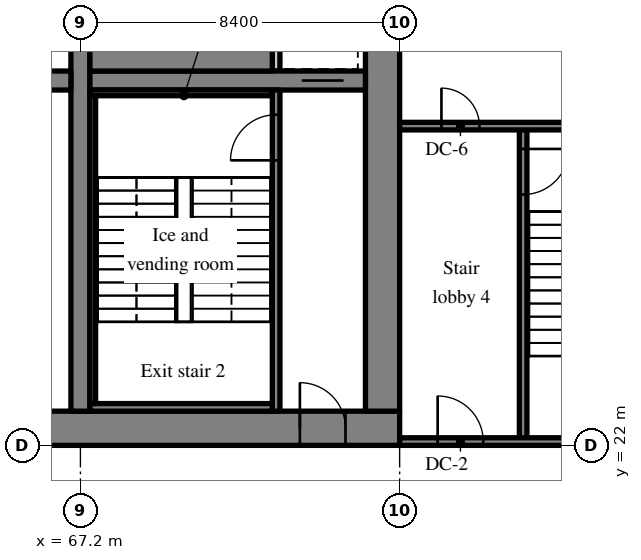
"""IFC4 building model, lengths in metres.
Left out: names, types, materials, properties, quantities, classifications, styles, units other than length and angle.
Written with IfcOpenShell. Run it as: python <this file> out.ifc"""

import sys

from ifc_helpers import new_model, si_unit, direction, frame, frame_2d, origin, place, context, subcontext, project, spatial, rectangle, extrude, source, transform, mapped, element, fill, save


model = new_model("IFC4")
c1 = context("Model", 3, precision=1e-05, world=origin(), true_north=direction((0.0, 1.0)))
c2 = subcontext(c1, "Body", "Model", "MODEL_VIEW")
j1 = project(units=[si_unit("LENGTHUNIT", "METRE"), si_unit("PLANEANGLEUNIT", "RADIAN")], contexts=[c1])
p1 = place(None, origin())
s1 = spatial("IfcSite", under=j1, at=p1, CompositionType="ELEMENT")
p2 = place(p1, origin())
s2 = spatial("IfcBuilding", under=s1, at=p2, CompositionType="ELEMENT")
p3 = place(p2, frame((0.0, 0.0, 133.2)))
s3 = spatial("IfcBuildingStorey", under=s2, at=p3, CompositionType="ELEMENT", Elevation=133.2)
m1 = source(origin(), c2, "Body", "SweptSolid", [
    extrude(rectangle(XDim=50.4, YDim=0.9, at=frame_2d((25.2, 0.0))), origin(), (0.0, 0.0, 1.0), 3.52),
])
p4 = place(p3, frame((25.2, 22.45, 0.0), z_axis=(0.0, 0.0, 1.0), x_axis=(1.0, 0.0, 0.0)))
e1 = element("IfcWall", 1, at=p4, inside=s3, PredefinedType="SHEAR", context=c2, shape_type="MappedRepresentation", body=[
    mapped(m1, transform((0.0, 0.0, 0.0), scale=1.0)),
])
m2 = source(origin(), c2, "Body", "SweptSolid", [
    extrude(rectangle(XDim=1.8, YDim=2.1, at=frame_2d((0.9, 1.05))), frame((0.0, 0.46, 0.0), z_axis=(0.0, -1.0, 0.0), x_axis=(1.0, 0.0, 0.0)), (0.0, 0.0, 1.0), 0.92),
])
p5 = place(p4, frame((15.9, 0.0, 0.0)))
e2 = element("IfcOpeningElement", 2, at=p5, cuts=e1, PredefinedType="OPENING", context=c2, shape_type="MappedRepresentation", body=[
    mapped(m2, transform((0.0, 0.0, 0.0), scale=1.0)),
])
m3 = source(origin(), c2, "Body", "SweptSolid", [
    extrude(rectangle(XDim=1.2, YDim=2.1, at=frame_2d((0.6, 1.05))), frame((0.0, 0.46, 0.0), z_axis=(0.0, -1.0, 0.0), x_axis=(1.0, 0.0, 0.0)), (0.0, 0.0, 1.0), 0.92),
])
p6 = place(p4, frame((26.975, 0.0, 0.0)))
e3 = element("IfcOpeningElement", 3, at=p6, cuts=e1, PredefinedType="OPENING", context=c2, shape_type="MappedRepresentation", body=[
    mapped(m3, transform((0.0, 0.0, 0.0), scale=1.0)),
])
m4 = source(origin(), c2, "Body", "SweptSolid", [
    extrude(rectangle(XDim=0.9, YDim=2.1, at=frame_2d((0.45, 1.05))), frame((0.0, 0.46, 0.0), z_axis=(0.0, -1.0, 0.0), x_axis=(1.0, 0.0, 0.0)), (0.0, 0.0, 1.0), 0.92),
])
p7 = place(p4, frame((34.5, 0.0, 0.0)))
e4 = element("IfcOpeningElement", 4, at=p7, cuts=e1, PredefinedType="OPENING", context=c2, shape_type="MappedRepresentation", body=[
    mapped(m4, transform((0.0, 0.0, 0.0), scale=1.0)),
])
p8 = place(p4, frame((31.5, 0.0, 0.0)))
e5 = element("IfcOpeningElement", 5, at=p8, cuts=e1, PredefinedType="OPENING", context=c2, shape_type="MappedRepresentation", body=[
    mapped(m4, transform((0.0, 0.0, 0.0), scale=1.0)),
])
p9 = place(p4, frame((39.788, 0.0, 0.0)))
e6 = element("IfcOpeningElement", 6, at=p9, cuts=e1, PredefinedType="OPENING", context=c2, shape_type="MappedRepresentation", body=[
    mapped(m4, transform((0.0, 0.0, 0.0), scale=1.0)),
])
p10 = place(p4, frame((36.762, 0.0, 0.0)))
e7 = element("IfcOpeningElement", 7, at=p10, cuts=e1, PredefinedType="OPENING", context=c2, shape_type="MappedRepresentation", body=[
    mapped(m4, transform((0.0, 0.0, 0.0), scale=1.0)),
])
p11 = place(p4, frame((6.45, 0.0, 0.0)))
e8 = element("IfcOpeningElement", 8, at=p11, cuts=e1, PredefinedType="OPENING", context=c2, shape_type="MappedRepresentation", body=[
    mapped(m3, transform((0.0, 0.0, 0.0), scale=1.0)),
])
p12 = place(p4, frame((47.775, 0.0, 0.0)))
e9 = element("IfcOpeningElement", 9, at=p12, cuts=e1, PredefinedType="OPENING", context=c2, shape_type="MappedRepresentation", body=[
    mapped(m3, transform((0.0, 0.0, 0.0), scale=1.0)),
])
m5 = source(origin(), c2, "Body", "SweptSolid", [
    extrude(rectangle(XDim=18.2, YDim=0.9, at=frame_2d((9.1, 0.0))), origin(), (0.0, 0.0, 1.0), 3.52),
])
p13 = place(p3, frame((75.15, 22.9, 0.0), z_axis=(0.0, 0.0, 1.0), x_axis=(0.0, 1.0, 0.0)))
e10 = element("IfcWall", 10, at=p13, inside=s3, PredefinedType="SHEAR", context=c2, shape_type="MappedRepresentation", body=[
    mapped(m5, transform((0.0, 0.0, 0.0), scale=1.0)),
])
p14 = place(p13, frame((12.5, 0.0, 0.0)))
e11 = element("IfcOpeningElement", 11, at=p14, cuts=e10, PredefinedType="OPENING", context=c2, shape_type="MappedRepresentation", body=[
    mapped(m3, transform((0.0, 0.0, 0.0), scale=1.0)),
])
m6 = source(origin(), c2, "Body", "SweptSolid", [
    extrude(rectangle(XDim=18.2, YDim=0.5, at=frame_2d((9.1, 0.0))), origin(), (0.0, 0.0, 1.0), 3.52),
])
p15 = place(p3, frame((67.2, 22.9, 0.0), z_axis=(0.0, 0.0, 1.0), x_axis=(0.0, 1.0, 0.0)))
e12 = element("IfcWall", 12, at=p15, inside=s3, PredefinedType="SHEAR", context=c2, shape_type="MappedRepresentation", body=[
    mapped(m6, transform((0.0, 0.0, 0.0), scale=1.0)),
])
m7 = source(origin(), c2, "Body", "SweptSolid", [
    extrude(rectangle(XDim=16.3, YDim=0.5, at=frame_2d((8.15, 0.0))), origin(), (0.0, 0.0, 1.0), 3.52),
])
p16 = place(p3, frame((50.65, 31.6, 0.0), z_axis=(0.0, 0.0, 1.0), x_axis=(1.0, 0.0, 0.0)))
e13 = element("IfcWall", 13, at=p16, inside=s3, PredefinedType="SHEAR", context=c2, shape_type="MappedRepresentation", body=[
    mapped(m7, transform((0.0, 0.0, 0.0), scale=1.0)),
])
m8 = source(origin(), c2, "Body", "SweptSolid", [
    extrude(rectangle(XDim=1.0, YDim=2.1, at=frame_2d((0.5, 1.05))), frame((0.0, 0.26, 0.0), z_axis=(0.0, -1.0, 0.0), x_axis=(1.0, 0.0, 0.0)), (0.0, 0.0, 1.0), 0.52),
])
p17 = place(p16, frame((0.575, 0.0, 0.0)))
e14 = element("IfcOpeningElement", 14, at=p17, cuts=e13, PredefinedType="OPENING", context=c2, shape_type="MappedRepresentation", body=[
    mapped(m8, transform((0.0, 0.0, 0.0), scale=1.0)),
])
m9 = source(origin(), c2, "Body", "SweptSolid", [
    extrude(rectangle(XDim=7.25, YDim=0.5, at=frame_2d((3.625, 0.0))), origin(), (0.0, 0.0, 1.0), 3.52),
])
p18 = place(p3, frame((67.45, 31.6, 0.0), z_axis=(0.0, 0.0, 1.0), x_axis=(1.0, 0.0, 0.0)))
e15 = element("IfcWall", 15, at=p18, inside=s3, PredefinedType="SHEAR", context=c2, shape_type="MappedRepresentation", body=[
    mapped(m9, transform((0.0, 0.0, 0.0), scale=1.0)),
])
m10 = source(origin(), c2, "Body", "SweptSolid", [
    extrude(rectangle(XDim=1.1, YDim=2.1, at=frame_2d((0.55, 1.05))), frame((0.0, 0.26, 0.0), z_axis=(0.0, -1.0, 0.0), x_axis=(1.0, 0.0, 0.0)), (0.0, 0.0, 1.0), 0.52),
])
p19 = place(p18, frame((5.575, 0.0, 0.0)))
e16 = element("IfcOpeningElement", 16, at=p19, cuts=e15, PredefinedType="OPENING", context=c2, shape_type="MappedRepresentation", body=[
    mapped(m10, transform((0.0, 0.0, 0.0), scale=1.0)),
])
m11 = source(origin(), c2, "Body", "SweptSolid", [
    extrude(rectangle(XDim=8.45, YDim=0.2, at=frame_2d((4.225, 0.0))), origin(), (0.0, 0.0, 1.0), 3.52),
])
p20 = place(p3, frame((72.35, 22.9, 0.0), z_axis=(0.0, 0.0, 1.0), x_axis=(0.0, 1.0, 0.0)))
e17 = element("IfcWall", 17, at=p20, inside=s3, PredefinedType="SOLIDWALL", context=c2, shape_type="MappedRepresentation", body=[
    mapped(m11, transform((0.0, 0.0, 0.0), scale=1.0)),
])
m12 = source(origin(), c2, "Body", "SweptSolid", [
    extrude(rectangle(XDim=1.2, YDim=2.1, at=frame_2d((0.6, 1.05))), frame((0.0, 0.11, 0.0), z_axis=(0.0, -1.0, 0.0), x_axis=(1.0, 0.0, 0.0)), (0.0, 0.0, 1.0), 0.22),
])
p21 = place(p20, frame((6.6, 0.0, 0.0)))
e18 = element("IfcOpeningElement", 18, at=p21, cuts=e17, PredefinedType="OPENING", context=c2, shape_type="MappedRepresentation", body=[
    mapped(m12, transform((0.0, 0.0, 0.0), scale=1.0)),
])
m13 = source(origin(), c2, "Body", "SweptSolid", [
    extrude(rectangle(XDim=1.75, YDim=0.2, at=frame_2d((0.875, 0.0))), origin(), (0.0, 0.0, 1.0), 3.52),
])
p22 = place(p3, frame((72.35, 31.85, 0.0), z_axis=(0.0, 0.0, 1.0), x_axis=(0.0, 1.0, 0.0)))
e19 = element("IfcWall", 19, at=p22, inside=s3, PredefinedType="SOLIDWALL", context=c2, shape_type="MappedRepresentation", body=[
    mapped(m13, transform((0.0, 0.0, 0.0), scale=1.0)),
])
m14 = source(origin(), c2, "Body", "SweptSolid", [
    extrude(rectangle(XDim=8.3, YDim=0.2, at=frame_2d((4.15, 0.0))), origin(), (0.0, 0.0, 1.0), 3.52),
])
p23 = place(p3, frame((78.85, 22.1, 0.0), z_axis=(0.0, 0.0, 1.0), x_axis=(0.0, 1.0, 0.0)))
e20 = element("IfcWall", 20, at=p23, inside=s3, PredefinedType="SOLIDWALL", context=c2, shape_type="MappedRepresentation", body=[
    mapped(m14, transform((0.0, 0.0, 0.0), scale=1.0)),
])
p24 = place(p23, frame((6.5, 0.0, 0.0)))
e21 = element("IfcOpeningElement", 21, at=p24, cuts=e20, PredefinedType="OPENING", context=c2, shape_type="MappedRepresentation", body=[
    mapped(m12, transform((0.0, 0.0, 0.0), scale=1.0)),
])
m15 = source(origin(), c2, "Body", "SweptSolid", [
    extrude(rectangle(XDim=8.225, YDim=0.2, at=frame_2d((4.112, 0.0))), origin(), (0.0, 0.0, 1.0), 3.52),
])
p25 = place(p3, frame((83.825, 22.1, 0.0), z_axis=(0.0, 0.0, 1.0), x_axis=(-1.0, 0.0, 0.0)))
e22 = element("IfcWall", 22, at=p25, inside=s3, PredefinedType="SOLIDWALL", context=c2, shape_type="MappedRepresentation", body=[
    mapped(m15, transform((0.0, 0.0, 0.0), scale=1.0)),
])
p26 = place(p25, frame((6.025, 0.0, 0.0)))
e23 = element("IfcOpeningElement", 23, at=p26, cuts=e22, PredefinedType="OPENING", context=c2, shape_type="MappedRepresentation", body=[
    mapped(m12, transform((0.0, 0.0, 0.0), scale=1.0)),
])
p27 = place(p3, frame((83.825, 30.4, 0.0), z_axis=(0.0, 0.0, 1.0), x_axis=(-1.0, 0.0, 0.0)))
e24 = element("IfcWall", 24, at=p27, inside=s3, PredefinedType="SOLIDWALL", context=c2, shape_type="MappedRepresentation", body=[
    mapped(m15, transform((0.0, 0.0, 0.0), scale=1.0)),
])
m16 = source(origin(), c2, "Body", "SweptSolid", [
    extrude(rectangle(XDim=1.0, YDim=2.1, at=frame_2d((0.5, 1.05))), frame((0.0, 0.11, 0.0), z_axis=(0.0, -1.0, 0.0), x_axis=(1.0, 0.0, 0.0)), (0.0, 0.0, 1.0), 0.22),
])
p28 = place(p27, frame((6.125, 0.0, 0.0)))
e25 = element("IfcOpeningElement", 25, at=p28, cuts=e24, PredefinedType="OPENING", context=c2, shape_type="MappedRepresentation", body=[
    mapped(m16, transform((0.0, 0.0, 0.0), scale=1.0)),
])
m17 = source(origin(), c2, "Body", "SweptSolid", [
    extrude(rectangle(XDim=4.8, YDim=0.2, at=frame_2d((2.4, 0.0))), origin(), (0.0, 0.0, 1.0), 3.52),
])
p29 = place(p3, frame((67.45, 23.0, 0.0), z_axis=(0.0, 0.0, 1.0), x_axis=(1.0, 0.0, 0.0)))
e26 = element("IfcWall", 26, at=p29, inside=s3, PredefinedType="SOLIDWALL", context=c2, shape_type="MappedRepresentation", body=[
    mapped(m17, transform((0.0, 0.0, 0.0), scale=1.0)),
])
m18 = source(origin(), c2, "Body", "SweptSolid", [
    extrude(rectangle(XDim=4.8, YDim=0.15, at=frame_2d((2.4, 0.0))), origin(), (0.0, 0.0, 1.0), 3.52),
])
p30 = place(p3, frame((67.45, 31.275, 0.0), z_axis=(0.0, 0.0, 1.0), x_axis=(1.0, 0.0, 0.0)))
e27 = element("IfcWall", 27, at=p30, inside=s3, PredefinedType="SOLIDWALL", context=c2, shape_type="MappedRepresentation", body=[
    mapped(m18, transform((0.0, 0.0, 0.0), scale=1.0)),
])
m19 = source(origin(), c2, "Body", "SweptSolid", [
    extrude(rectangle(XDim=8.1, YDim=0.15, at=frame_2d((4.05, 0.0))), origin(), (0.0, 0.0, 1.0), 3.52),
])
p31 = place(p3, frame((67.525, 23.1, 0.0), z_axis=(0.0, 0.0, 1.0), x_axis=(0.0, 1.0, 0.0)))
e28 = element("IfcWall", 28, at=p31, inside=s3, PredefinedType="SOLIDWALL", context=c2, shape_type="MappedRepresentation", body=[
    mapped(m19, transform((0.0, 0.0, 0.0), scale=1.0)),
])
m20 = source(origin(), c2, "Body", "SweptSolid", [
    extrude(rectangle(XDim=4.8, YDim=0.95, at=frame_2d((2.4, 0.0))), origin(), (0.0, 0.0, 1.0), 3.52),
])
p32 = place(p3, frame((67.45, 32.325, 0.0), z_axis=(0.0, 0.0, 1.0), x_axis=(1.0, 0.0, 0.0)))
e29 = element("IfcWall", 29, at=p32, inside=s3, PredefinedType="SOLIDWALL", context=c2, shape_type="MappedRepresentation", body=[
    mapped(m20, transform((0.0, 0.0, 0.0), scale=1.0)),
])
m21 = source(origin(), c2, "Body", "SweptSolid", [
    extrude(rectangle(XDim=1.2, YDim=2.1, at=frame_2d((0.6, 1.05))), frame((0.0, 0.025, 0.0), z_axis=(0.0, -1.0, 0.0), x_axis=(1.0, 0.0, 0.0)), (0.0, 0.0, 1.0), 0.05),
])
p33 = place(p21, origin())
e30 = element("IfcDoor", 30, at=p33, inside=s3, OperationType="SINGLE_SWING_LEFT", PredefinedType="DOOR", context=c2, shape_type="MappedRepresentation", body=[
    mapped(m21, transform((0.0, 0.0, 0.0), scale=1.0)),
])
fill(e18, e30)
m22 = source(origin(), c2, "Body", "SweptSolid", [
    extrude(rectangle(XDim=1.2, YDim=2.1, at=frame_2d((0.6, 1.05))), frame((0.0, 0.375, 0.0), z_axis=(0.0, -1.0, 0.0), x_axis=(1.0, 0.0, 0.0)), (0.0, 0.0, 1.0), 0.05),
])
p34 = place(p12, origin())
e31 = element("IfcDoor", 31, at=p34, inside=s3, OperationType="SINGLE_SWING_LEFT", PredefinedType="DOOR", context=c2, shape_type="MappedRepresentation", body=[
    mapped(m22, transform((0.0, 0.0, 0.0), scale=1.0)),
])
fill(e9, e31)
m23 = source(origin(), c2, "Body", "SweptSolid", [
    extrude(rectangle(XDim=1.1, YDim=2.1, at=frame_2d((0.55, 1.05))), frame((0.0, 0.025, 0.0), z_axis=(0.0, -1.0, 0.0), x_axis=(1.0, 0.0, 0.0)), (0.0, 0.0, 1.0), 0.05),
])
p35 = place(p19, origin())
e32 = element("IfcDoor", 32, at=p35, inside=s3, OperationType="SLIDING_TO_RIGHT", PredefinedType="DOOR", context=c2, shape_type="MappedRepresentation", body=[
    mapped(m23, transform((0.0, 0.0, 0.0), scale=1.0)),
])
fill(e16, e32)
p36 = place(p24, origin())
e33 = element("IfcDoor", 33, at=p36, inside=s3, OperationType="SINGLE_SWING_RIGHT", PredefinedType="DOOR", context=c2, shape_type="MappedRepresentation", body=[
    mapped(m21, transform((0.0, 0.0, 0.0), scale=1.0)),
])
fill(e21, e33)
p37 = place(p26, origin())
e34 = element("IfcDoor", 34, at=p37, inside=s3, OperationType="SINGLE_SWING_RIGHT", PredefinedType="DOOR", context=c2, shape_type="MappedRepresentation", body=[
    mapped(m21, transform((0.0, 0.0, 0.0), scale=1.0)),
])
fill(e23, e34)
m24 = source(origin(), c2, "Body", "SweptSolid", [
    extrude(rectangle(XDim=1.0, YDim=2.1, at=frame_2d((0.5, 1.05))), frame((0.0, 0.025, 0.0), z_axis=(0.0, -1.0, 0.0), x_axis=(1.0, 0.0, 0.0)), (0.0, 0.0, 1.0), 0.05),
])
p38 = place(p28, origin())
e35 = element("IfcDoor", 35, at=p38, inside=s3, OperationType="SINGLE_SWING_RIGHT", PredefinedType="DOOR", context=c2, shape_type="MappedRepresentation", body=[
    mapped(m24, transform((0.0, 0.0, 0.0), scale=1.0)),
])
fill(e25, e35)
save(model, sys.argv[1])
